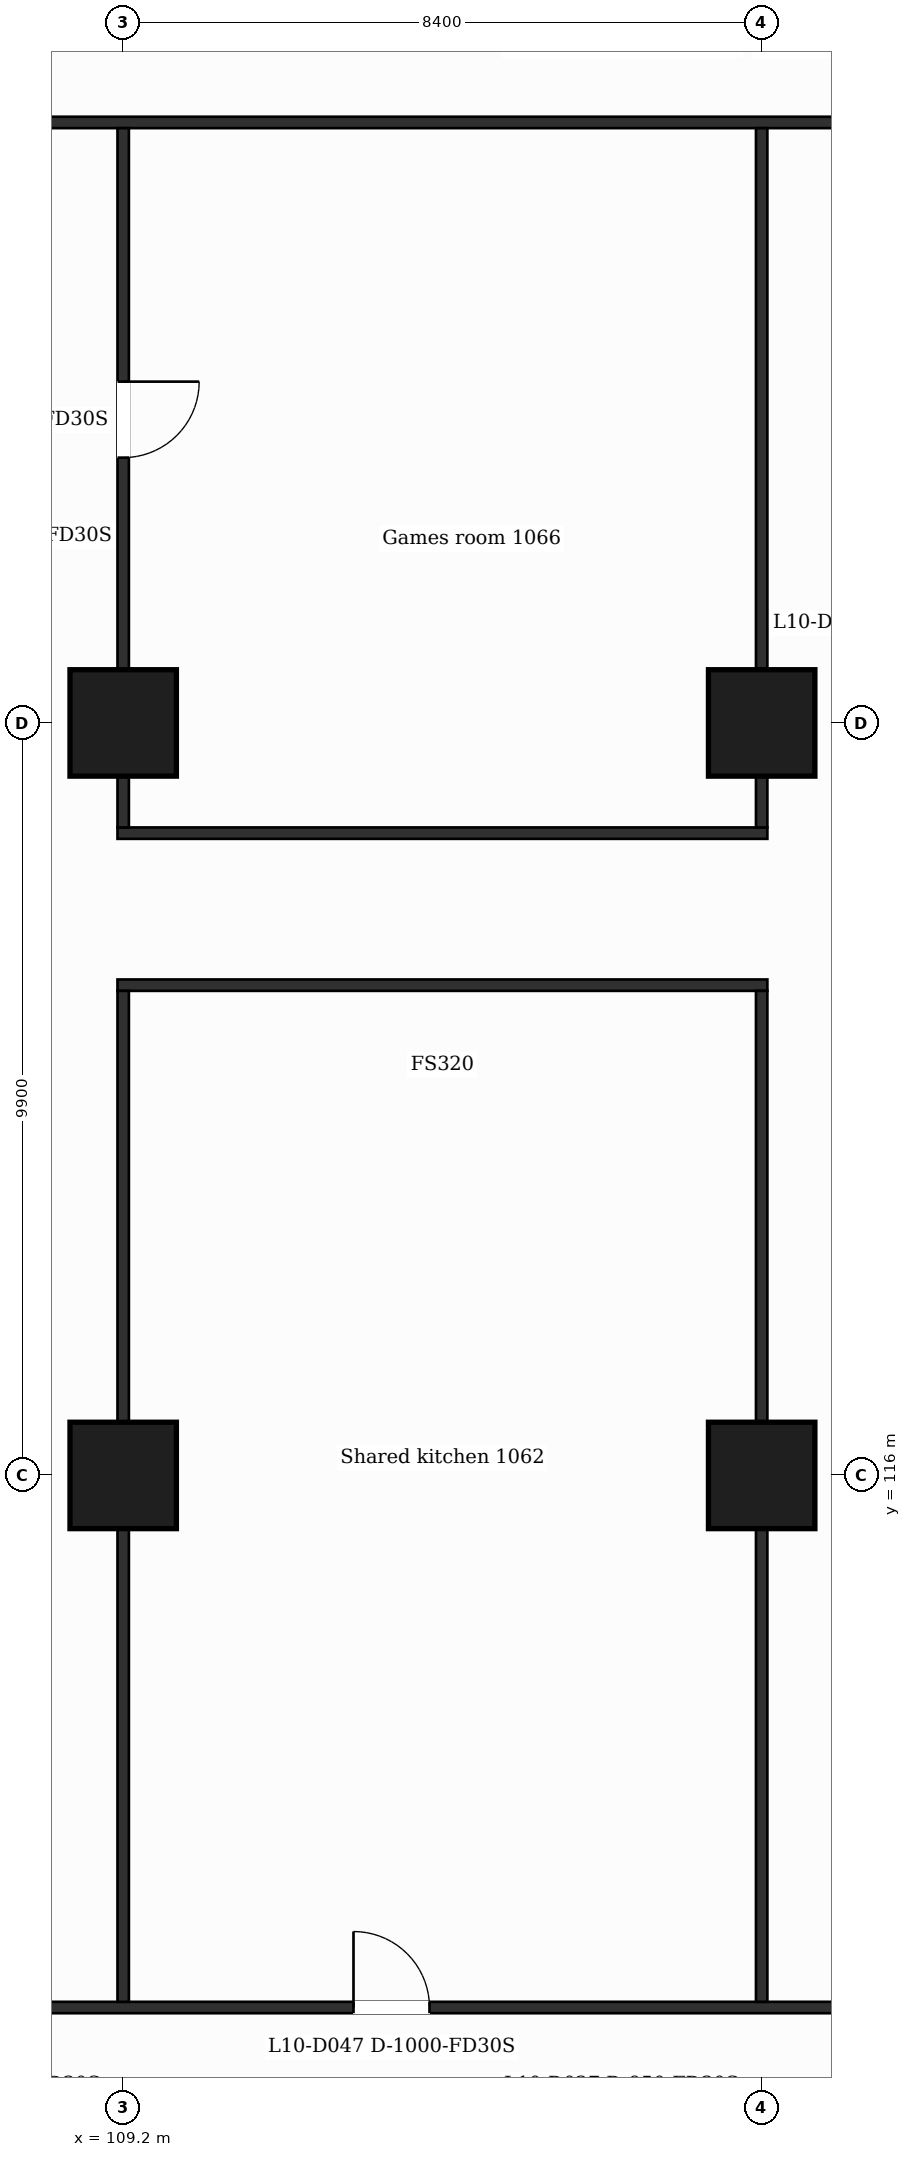
"""IFC4 building model, lengths in metres.
Left out: names, types, materials, properties, quantities, classifications, styles, units other than length and angle.
Written with IfcOpenShell. Run it as: python <this file> out.ifc"""

import sys

from ifc_helpers import new_model, si_unit, direction, frame, frame_2d, origin, origin_2d, place, context, subcontext, project, spatial, rectangle, extrude, element, fill, save


model = new_model("IFC4")
c1 = context("Model", 3, precision=1e-05, world=origin(), true_north=direction((0.0, 1.0)))
c2 = subcontext(c1, "Body", "Model", "MODEL_VIEW")
j1 = project(units=[si_unit("LENGTHUNIT", "METRE"), si_unit("PLANEANGLEUNIT", "RADIAN")], contexts=[c1])
p1 = place(None, origin())
s1 = spatial("IfcSite", under=j1, at=p1, CompositionType="ELEMENT")
p2 = place(p1, origin())
s2 = spatial("IfcBuilding", under=s1, at=p2, CompositionType="ELEMENT")
p3 = place(p2, frame((0.0, 0.0, 53.0)))
s3 = spatial("IfcBuildingStorey", under=s2, at=p3, CompositionType="ELEMENT", Elevation=53.0)
for number, where, z_axis, x_axis in (
    (1, (109.2, 116.0, 0.0), (0.0, 0.0, 1.0), (1.0, 0.0, 0.0)),
    (2, (117.6, 116.0, 0.0), (0.0, 0.0, 1.0), (1.0, 0.0, 0.0)),
    (3, (109.2, 125.9, 0.0), (0.0, 0.0, 1.0), (1.0, 0.0, 0.0)),
    (4, (117.6, 125.9, 0.0), (0.0, 0.0, 1.0), (1.0, 0.0, 0.0)),
):
    element("IfcColumn", number, at=place(p3, frame(where, z_axis=z_axis, x_axis=x_axis)), inside=s3, PredefinedType="COLUMN", context=c2, shape_type="SweptSolid", body=[
        extrude(rectangle(XDim=1.4, YDim=1.4, at=origin_2d()), origin(), (0.0, 0.0, 1.0), 3.5),
    ])
p4 = place(p3, frame((100.725, 109.0, 0.0), z_axis=(0.0, 0.0, 1.0), x_axis=(1.0, 0.0, 0.0)))
e5 = element("IfcWall", 5, at=p4, inside=s3, PredefinedType="PARTITIONING", context=c2, shape_type="SweptSolid", body=[
    extrude(rectangle(XDim=25.35, YDim=0.15, at=frame_2d((12.675, 0.0))), origin(), (0.0, 0.0, 1.0), 3.18),
])
p5 = place(p4, frame((1.975, 0.0, 0.0)))
e6 = element("IfcOpeningElement", 6, at=p5, cuts=e5, PredefinedType="OPENING", context=c2, shape_type="SweptSolid", body=[
    extrude(rectangle(XDim=1.0, YDim=2.1, at=frame_2d((0.5, 1.05))), frame((0.0, 0.085, 0.0), z_axis=(0.0, -1.0, 0.0), x_axis=(1.0, 0.0, 0.0)), (0.0, 0.0, 1.0), 0.17),
])
p6 = place(p4, frame((11.505, 0.0, 0.0)))
e7 = element("IfcOpeningElement", 7, at=p6, cuts=e5, PredefinedType="OPENING", context=c2, shape_type="SweptSolid", body=[
    extrude(rectangle(XDim=1.0, YDim=2.1, at=frame_2d((0.5, 1.05))), frame((0.0, 0.085, 0.0), z_axis=(0.0, -1.0, 0.0), x_axis=(1.0, 0.0, 0.0)), (0.0, 0.0, 1.0), 0.17),
])
p7 = place(p4, frame((22.065, 0.0, 0.0)))
e8 = element("IfcOpeningElement", 8, at=p7, cuts=e5, PredefinedType="OPENING", context=c2, shape_type="SweptSolid", body=[
    extrude(rectangle(XDim=1.0, YDim=2.1, at=frame_2d((0.5, 1.05))), frame((0.0, 0.085, 0.0), z_axis=(0.0, -1.0, 0.0), x_axis=(1.0, 0.0, 0.0)), (0.0, 0.0, 1.0), 0.17),
])
for number, where, z_axis, x_axis in (
    (9, (109.125, 122.45, 0.0), (0.0, 0.0, 1.0), (1.0, 0.0, 0.0)),
    (10, (109.125, 124.45, 0.0), (0.0, 0.0, 1.0), (1.0, 0.0, 0.0)),
):
    element("IfcWall", number, at=place(p3, frame(where, z_axis=z_axis, x_axis=x_axis)), inside=s3, PredefinedType="PARTITIONING", context=c2, shape_type="SweptSolid", body=[
        extrude(rectangle(XDim=8.55, YDim=0.15, at=frame_2d((4.275, 0.0))), origin(), (0.0, 0.0, 1.0), 3.18),
    ])
p8 = place(p3, frame((100.725, 133.8, 0.0), z_axis=(0.0, 0.0, 1.0), x_axis=(1.0, 0.0, 0.0)))
e11 = element("IfcWall", 11, at=p8, inside=s3, PredefinedType="PARTITIONING", context=c2, shape_type="SweptSolid", body=[
    extrude(rectangle(XDim=25.35, YDim=0.15, at=frame_2d((12.675, 0.0))), origin(), (0.0, 0.0, 1.0), 3.18),
])
p9 = place(p3, frame((109.2, 109.075, 0.0), z_axis=(0.0, 0.0, 1.0), x_axis=(0.0, 1.0, 0.0)))
e12 = element("IfcWall", 12, at=p9, inside=s3, PredefinedType="PARTITIONING", context=c2, shape_type="SweptSolid", body=[
    extrude(rectangle(XDim=13.3, YDim=0.15, at=frame_2d((6.65, 0.0))), origin(), (0.0, 0.0, 1.0), 3.18),
])
p10 = place(p3, frame((109.2, 124.525, 0.0), z_axis=(0.0, 0.0, 1.0), x_axis=(0.0, 1.0, 0.0)))
e13 = element("IfcWall", 13, at=p10, inside=s3, PredefinedType="PARTITIONING", context=c2, shape_type="SweptSolid", body=[
    extrude(rectangle(XDim=9.2, YDim=0.15, at=frame_2d((4.6, 0.0))), origin(), (0.0, 0.0, 1.0), 3.18),
])
p11 = place(p10, frame((4.865, 0.0, 0.0)))
e14 = element("IfcOpeningElement", 14, at=p11, cuts=e13, PredefinedType="OPENING", context=c2, shape_type="SweptSolid", body=[
    extrude(rectangle(XDim=1.0, YDim=2.1, at=frame_2d((0.5, 1.05))), frame((0.0, 0.085, 0.0), z_axis=(0.0, -1.0, 0.0), x_axis=(1.0, 0.0, 0.0)), (0.0, 0.0, 1.0), 0.17),
])
p12 = place(p3, frame((117.6, 109.075, 0.0), z_axis=(0.0, 0.0, 1.0), x_axis=(0.0, 1.0, 0.0)))
e15 = element("IfcWall", 15, at=p12, inside=s3, PredefinedType="PARTITIONING", context=c2, shape_type="SweptSolid", body=[
    extrude(rectangle(XDim=13.3, YDim=0.15, at=frame_2d((6.65, 0.0))), origin(), (0.0, 0.0, 1.0), 3.18),
])
p13 = place(p3, frame((117.6, 124.525, 0.0), z_axis=(0.0, 0.0, 1.0), x_axis=(0.0, 1.0, 0.0)))
e16 = element("IfcWall", 16, at=p13, inside=s3, PredefinedType="PARTITIONING", context=c2, shape_type="SweptSolid", body=[
    extrude(rectangle(XDim=9.2, YDim=0.15, at=frame_2d((4.6, 0.0))), origin(), (0.0, 0.0, 1.0), 3.18),
])
p14 = place(p6, origin())
e17 = element("IfcDoor", 17, at=p14, inside=s3, OperationType="SINGLE_SWING_LEFT", PredefinedType="DOOR", context=c2, shape_type="SweptSolid", body=[
    extrude(rectangle(XDim=1.0, YDim=2.1, at=frame_2d((0.5, 1.05))), frame((0.0, 0.025, 0.0), z_axis=(0.0, -1.0, 0.0), x_axis=(1.0, 0.0, 0.0)), (0.0, 0.0, 1.0), 0.05),
])
fill(e7, e17)
p15 = place(p11, origin())
e18 = element("IfcDoor", 18, at=p15, inside=s3, OperationType="SINGLE_SWING_RIGHT", PredefinedType="DOOR", context=c2, shape_type="SweptSolid", body=[
    extrude(rectangle(XDim=1.0, YDim=2.1, at=frame_2d((0.5, 1.05))), frame((0.0, 0.025, 0.0), z_axis=(0.0, -1.0, 0.0), x_axis=(1.0, 0.0, 0.0)), (0.0, 0.0, 1.0), 0.05),
])
fill(e14, e18)
save(model, sys.argv[1])
